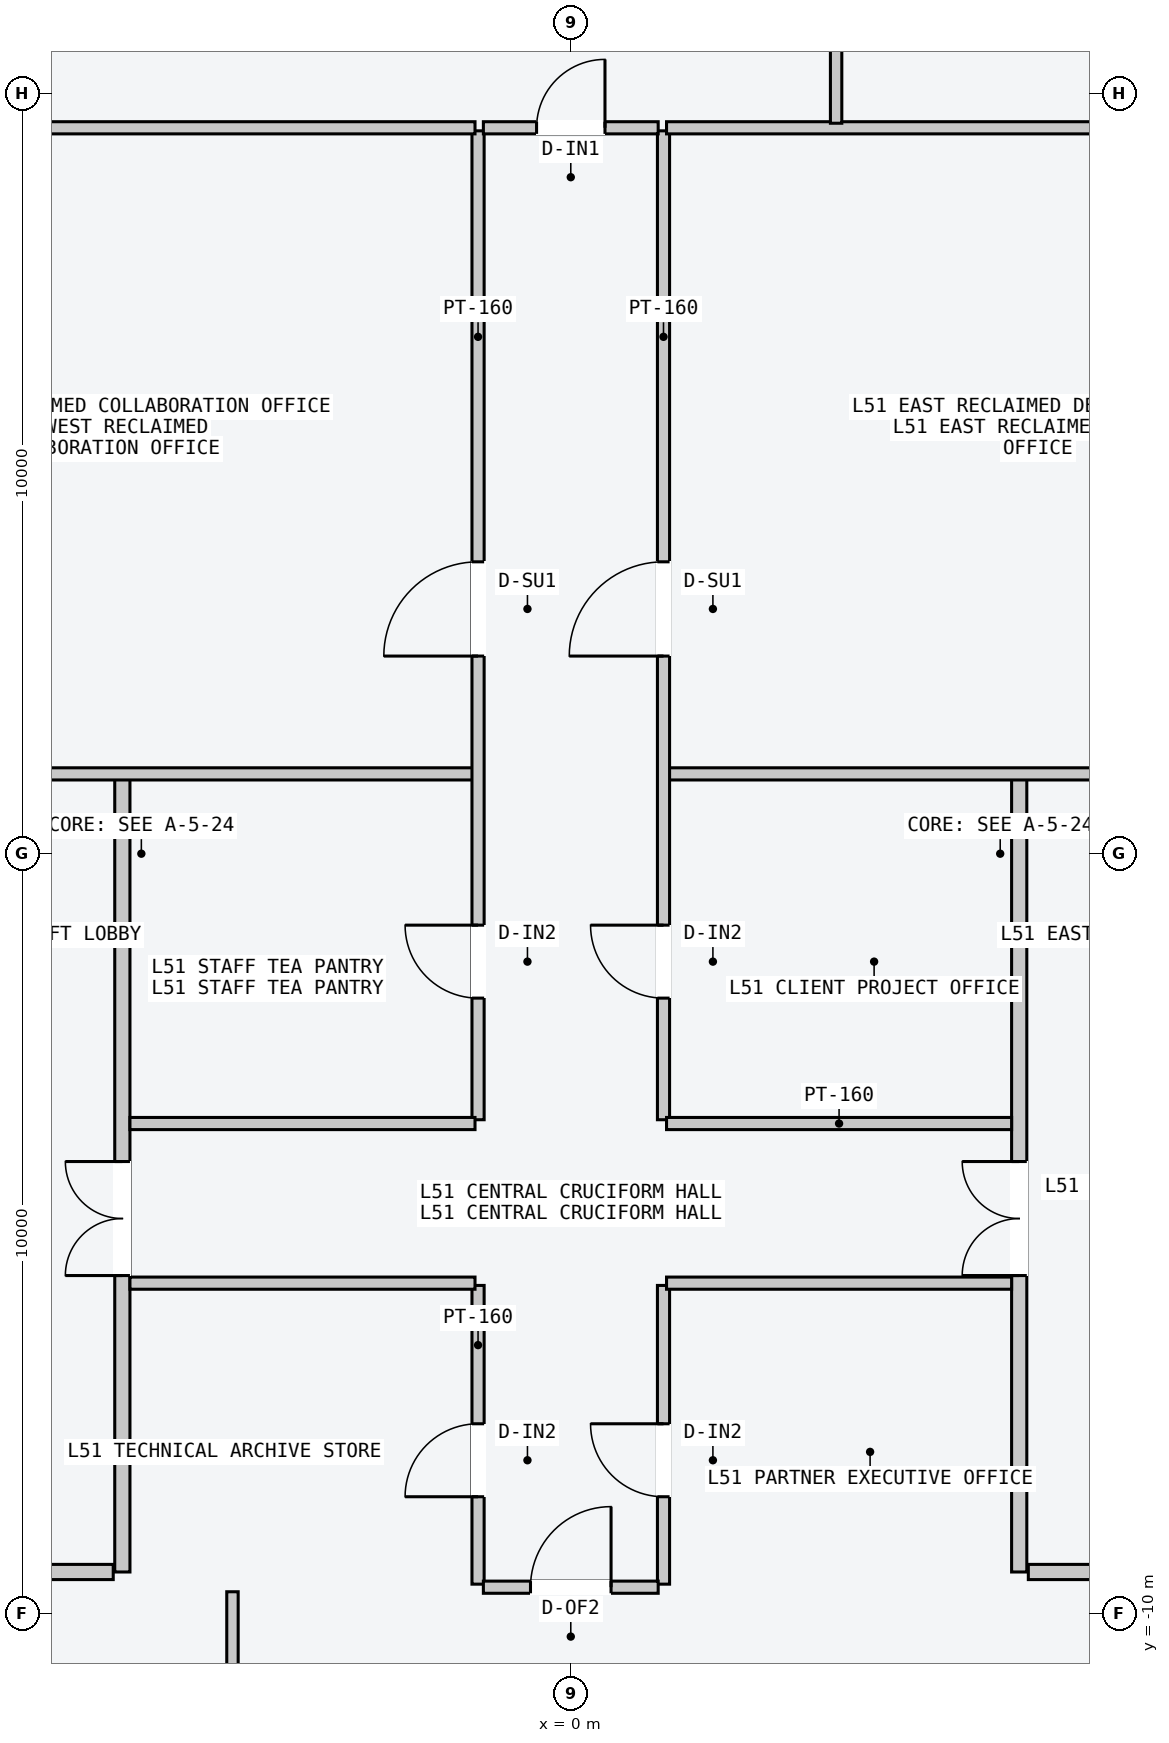
"""IFC4 building model, lengths in metres.
Left out: names, types, materials, properties, quantities, classifications, styles, units other than length and angle.
Written with IfcOpenShell. Run it as: python <this file> out.ifc"""

import sys

from ifc_helpers import new_model, si_unit, direction, frame, frame_2d, origin, place, context, subcontext, project, spatial, rectangle, extrude, element, fill, save


model = new_model("IFC4")
c1 = context("Model", 3, precision=1e-05, world=origin(), true_north=direction((0.0, 1.0)))
c2 = subcontext(c1, "Body", "Model", "MODEL_VIEW")
j1 = project(units=[si_unit("LENGTHUNIT", "METRE"), si_unit("PLANEANGLEUNIT", "RADIAN")], contexts=[c1])
p1 = place(None, origin())
s1 = spatial("IfcSite", under=j1, at=p1, CompositionType="ELEMENT")
p2 = place(p1, origin())
s2 = spatial("IfcBuilding", under=s1, at=p2, CompositionType="ELEMENT")
p3 = place(p2, frame((0.0, 0.0, 194.7)))
s3 = spatial("IfcBuildingStorey", under=s2, at=p3, CompositionType="ELEMENT", Elevation=194.7)
p4 = place(p3, frame((-5.9, -9.45, 0.0), z_axis=(0.0, 0.0, 1.0), x_axis=(0.0, 1.0, 0.0)))
e1 = element("IfcWall", 1, at=p4, inside=s3, PredefinedType="PARTITIONING", context=c2, shape_type="SweptSolid", body=[
    extrude(rectangle(XDim=10.5, YDim=0.2, at=frame_2d((5.25, 0.0))), origin(), (0.0, 0.0, 1.0), 3.4),
])
p5 = place(p4, frame((3.9, 0.0, 0.0)))
e2 = element("IfcOpeningElement", 2, at=p5, cuts=e1, PredefinedType="OPENING", context=c2, shape_type="SweptSolid", body=[
    extrude(rectangle(XDim=1.5, YDim=2.2, at=frame_2d((0.75, 1.1))), frame((0.0, 0.11, 0.0), z_axis=(0.0, -1.0, 0.0), x_axis=(1.0, 0.0, 0.0)), (0.0, 0.0, 1.0), 0.22),
])
p6 = place(p3, frame((-6.02, -9.45, 0.0), z_axis=(0.0, 0.0, 1.0), x_axis=(-1.0, 0.0, 0.0)))
e3 = element("IfcWall", 3, at=p6, inside=s3, PredefinedType="PARTITIONING", context=c2, shape_type="SweptSolid", body=[
    extrude(rectangle(XDim=1.8, YDim=0.2, at=frame_2d((0.9, 0.0))), origin(), (0.0, 0.0, 1.0), 3.4),
])
p7 = place(p3, frame((5.9, -9.45, 0.0), z_axis=(0.0, 0.0, 1.0), x_axis=(0.0, 1.0, 0.0)))
e4 = element("IfcWall", 4, at=p7, inside=s3, PredefinedType="PARTITIONING", context=c2, shape_type="SweptSolid", body=[
    extrude(rectangle(XDim=10.5, YDim=0.2, at=frame_2d((5.25, 0.0))), origin(), (0.0, 0.0, 1.0), 3.4),
])
p8 = place(p7, frame((3.9, 0.0, 0.0)))
e5 = element("IfcOpeningElement", 5, at=p8, cuts=e4, PredefinedType="OPENING", context=c2, shape_type="SweptSolid", body=[
    extrude(rectangle(XDim=1.5, YDim=2.2, at=frame_2d((0.75, 1.1))), frame((0.0, 0.11, 0.0), z_axis=(0.0, -1.0, 0.0), x_axis=(1.0, 0.0, 0.0)), (0.0, 0.0, 1.0), 0.22),
])
p9 = place(p3, frame((6.02, -9.45, 0.0), z_axis=(0.0, 0.0, 1.0), x_axis=(1.0, 0.0, 0.0)))
e6 = element("IfcWall", 6, at=p9, inside=s3, PredefinedType="PARTITIONING", context=c2, shape_type="SweptSolid", body=[
    extrude(rectangle(XDim=1.8, YDim=0.2, at=frame_2d((0.9, 0.0))), origin(), (0.0, 0.0, 1.0), 3.4),
])
p10 = place(p3, frame((-10.05, 1.05, 0.0), z_axis=(0.0, 0.0, 1.0), x_axis=(1.0, 0.0, 0.0)))
e7 = element("IfcWall", 7, at=p10, inside=s3, PredefinedType="PARTITIONING", context=c2, shape_type="SweptSolid", body=[
    extrude(rectangle(XDim=8.79, YDim=0.16, at=frame_2d((4.395, 0.0))), origin(), (0.0, 0.0, 1.0), 3.4),
])
p11 = place(p3, frame((-1.22, -3.5, 0.0), z_axis=(0.0, 0.0, 1.0), x_axis=(0.0, 1.0, 0.0)))
e8 = element("IfcWall", 8, at=p11, inside=s3, PredefinedType="PARTITIONING", context=c2, shape_type="SweptSolid", body=[
    extrude(rectangle(XDim=13.01, YDim=0.16, at=frame_2d((6.505, 0.0))), origin(), (0.0, 0.0, 1.0), 3.4),
])
p12 = place(p11, frame((6.1, 0.0, 0.0)))
e9 = element("IfcOpeningElement", 9, at=p12, cuts=e8, PredefinedType="OPENING", context=c2, shape_type="SweptSolid", body=[
    extrude(rectangle(XDim=1.24, YDim=2.24, at=frame_2d((0.62, 1.12))), frame((0.0, 0.09, 0.0), z_axis=(0.0, -1.0, 0.0), x_axis=(1.0, 0.0, 0.0)), (0.0, 0.0, 1.0), 0.18),
])
p13 = place(p11, frame((1.6, 0.0, 0.0)))
e10 = element("IfcOpeningElement", 10, at=p13, cuts=e8, PredefinedType="OPENING", context=c2, shape_type="SweptSolid", body=[
    extrude(rectangle(XDim=0.96, YDim=2.18, at=frame_2d((0.48, 1.09))), frame((0.0, 0.09, 0.0), z_axis=(0.0, -1.0, 0.0), x_axis=(1.0, 0.0, 0.0)), (0.0, 0.0, 1.0), 0.18),
])
p14 = place(p3, frame((-7.5, 9.55, 0.0), z_axis=(0.0, 0.0, 1.0), x_axis=(1.0, 0.0, 0.0)))
e11 = element("IfcWall", 11, at=p14, inside=s3, PredefinedType="PARTITIONING", context=c2, shape_type="SweptSolid", body=[
    extrude(rectangle(XDim=6.24, YDim=0.16, at=frame_2d((3.12, 0.0))), origin(), (0.0, 0.0, 1.0), 3.4),
])
p15 = place(p3, frame((-5.8, -3.55, 0.0), z_axis=(0.0, 0.0, 1.0), x_axis=(1.0, 0.0, 0.0)))
e12 = element("IfcWall", 12, at=p15, inside=s3, PredefinedType="PARTITIONING", context=c2, shape_type="SweptSolid", body=[
    extrude(rectangle(XDim=4.54, YDim=0.16, at=frame_2d((2.27, 0.0))), origin(), (0.0, 0.0, 1.0), 3.4),
])
p16 = place(p3, frame((1.26, 1.05, 0.0), z_axis=(0.0, 0.0, 1.0), x_axis=(1.0, 0.0, 0.0)))
e13 = element("IfcWall", 13, at=p16, inside=s3, PredefinedType="PARTITIONING", context=c2, shape_type="SweptSolid", body=[
    extrude(rectangle(XDim=8.8, YDim=0.16, at=frame_2d((4.4, 0.0))), origin(), (0.0, 0.0, 1.0), 3.4),
])
p17 = place(p3, frame((1.22, -3.5, 0.0), z_axis=(0.0, 0.0, 1.0), x_axis=(0.0, 1.0, 0.0)))
e14 = element("IfcWall", 14, at=p17, inside=s3, PredefinedType="PARTITIONING", context=c2, shape_type="SweptSolid", body=[
    extrude(rectangle(XDim=13.01, YDim=0.16, at=frame_2d((6.505, 0.0))), origin(), (0.0, 0.0, 1.0), 3.4),
])
p18 = place(p17, frame((6.1, 0.0, 0.0)))
e15 = element("IfcOpeningElement", 15, at=p18, cuts=e14, PredefinedType="OPENING", context=c2, shape_type="SweptSolid", body=[
    extrude(rectangle(XDim=1.24, YDim=2.24, at=frame_2d((0.62, 1.12))), frame((0.0, 0.09, 0.0), z_axis=(0.0, -1.0, 0.0), x_axis=(1.0, 0.0, 0.0)), (0.0, 0.0, 1.0), 0.18),
])
p19 = place(p17, frame((1.6, 0.0, 0.0)))
e16 = element("IfcOpeningElement", 16, at=p19, cuts=e14, PredefinedType="OPENING", context=c2, shape_type="SweptSolid", body=[
    extrude(rectangle(XDim=0.96, YDim=2.18, at=frame_2d((0.48, 1.09))), frame((0.0, 0.09, 0.0), z_axis=(0.0, -1.0, 0.0), x_axis=(1.0, 0.0, 0.0)), (0.0, 0.0, 1.0), 0.18),
])
p20 = place(p3, frame((1.26, 9.55, 0.0), z_axis=(0.0, 0.0, 1.0), x_axis=(1.0, 0.0, 0.0)))
e17 = element("IfcWall", 17, at=p20, inside=s3, PredefinedType="PARTITIONING", context=c2, shape_type="SweptSolid", body=[
    extrude(rectangle(XDim=6.24, YDim=0.16, at=frame_2d((3.12, 0.0))), origin(), (0.0, 0.0, 1.0), 3.4),
])
p21 = place(p3, frame((1.26, -3.55, 0.0), z_axis=(0.0, 0.0, 1.0), x_axis=(1.0, 0.0, 0.0)))
e18 = element("IfcWall", 18, at=p21, inside=s3, PredefinedType="PARTITIONING", context=c2, shape_type="SweptSolid", body=[
    extrude(rectangle(XDim=4.54, YDim=0.16, at=frame_2d((2.27, 0.0))), origin(), (0.0, 0.0, 1.0), 3.4),
])
p22 = place(p3, frame((-1.22, -9.61, 0.0), z_axis=(0.0, 0.0, 1.0), x_axis=(0.0, 1.0, 0.0)))
e19 = element("IfcWall", 19, at=p22, inside=s3, PredefinedType="PARTITIONING", context=c2, shape_type="SweptSolid", body=[
    extrude(rectangle(XDim=3.93, YDim=0.16, at=frame_2d((1.965, 0.0))), origin(), (0.0, 0.0, 1.0), 3.4),
])
p23 = place(p22, frame((1.15, 0.0, 0.0)))
e20 = element("IfcOpeningElement", 20, at=p23, cuts=e19, PredefinedType="OPENING", context=c2, shape_type="SweptSolid", body=[
    extrude(rectangle(XDim=0.96, YDim=2.18, at=frame_2d((0.48, 1.09))), frame((0.0, 0.09, 0.0), z_axis=(0.0, -1.0, 0.0), x_axis=(1.0, 0.0, 0.0)), (0.0, 0.0, 1.0), 0.18),
])
p24 = place(p3, frame((1.22, -9.61, 0.0), z_axis=(0.0, 0.0, 1.0), x_axis=(0.0, 1.0, 0.0)))
e21 = element("IfcWall", 21, at=p24, inside=s3, PredefinedType="PARTITIONING", context=c2, shape_type="SweptSolid", body=[
    extrude(rectangle(XDim=3.93, YDim=0.16, at=frame_2d((1.965, 0.0))), origin(), (0.0, 0.0, 1.0), 3.4),
])
p25 = place(p24, frame((1.15, 0.0, 0.0)))
e22 = element("IfcOpeningElement", 22, at=p25, cuts=e21, PredefinedType="OPENING", context=c2, shape_type="SweptSolid", body=[
    extrude(rectangle(XDim=0.96, YDim=2.18, at=frame_2d((0.48, 1.09))), frame((0.0, 0.09, 0.0), z_axis=(0.0, -1.0, 0.0), x_axis=(1.0, 0.0, 0.0)), (0.0, 0.0, 1.0), 0.18),
])
for number, where, z_axis, x_axis in (
    (23, (-5.8, -5.65, 0.0), (0.0, 0.0, 1.0), (1.0, 0.0, 0.0)),
    (24, (1.26, -5.65, 0.0), (0.0, 0.0, 1.0), (1.0, 0.0, 0.0)),
):
    element("IfcWall", number, at=place(p3, frame(where, z_axis=z_axis, x_axis=x_axis)), inside=s3, PredefinedType="PARTITIONING", context=c2, shape_type="SweptSolid", body=[
        extrude(rectangle(XDim=4.54, YDim=0.16, at=frame_2d((2.27, 0.0))), origin(), (0.0, 0.0, 1.0), 3.4),
    ])
p26 = place(p3, frame((3.491, 9.61, 0.0), z_axis=(0.0, 0.0, 1.0), x_axis=(0.0, 1.0, 0.0)))
e25 = element("IfcWall", 25, at=p26, inside=s3, PredefinedType="PARTITIONING", context=c2, shape_type="SweptSolid", body=[
    extrude(rectangle(XDim=8.95, YDim=0.15, at=frame_2d((4.475, 0.0))), origin(), (0.0, 0.0, 1.0), 3.4),
])
p27 = place(p26, frame((1.15, 0.0, 0.0)))
e26 = element("IfcOpeningElement", 26, at=p27, cuts=e25, PredefinedType="OPENING", context=c2, shape_type="SweptSolid", body=[
    extrude(rectangle(XDim=0.96, YDim=2.18, at=frame_2d((0.48, 1.09))), frame((0.0, 0.085, 0.0), z_axis=(0.0, -1.0, 0.0), x_axis=(1.0, 0.0, 0.0)), (0.0, 0.0, 1.0), 0.17),
])
p28 = place(p3, frame((-1.15, 9.55, 0.0), z_axis=(0.0, 0.0, 1.0), x_axis=(1.0, 0.0, 0.0)))
e27 = element("IfcWall", 27, at=p28, inside=s3, PredefinedType="PARTITIONING", context=c2, shape_type="SweptSolid", body=[
    extrude(rectangle(XDim=2.3, YDim=0.16, at=frame_2d((1.15, 0.0))), origin(), (0.0, 0.0, 1.0), 3.4),
])
p29 = place(p28, frame((0.7, 0.0, 0.0)))
e28 = element("IfcOpeningElement", 28, at=p29, cuts=e27, PredefinedType="OPENING", context=c2, shape_type="SweptSolid", body=[
    extrude(rectangle(XDim=0.9, YDim=2.15, at=frame_2d((0.45, 1.075))), frame((0.0, 0.09, 0.0), z_axis=(0.0, -1.0, 0.0), x_axis=(1.0, 0.0, 0.0)), (0.0, 0.0, 1.0), 0.18),
])
p30 = place(p3, frame((-4.451, -18.56, 0.0), z_axis=(0.0, 0.0, 1.0), x_axis=(0.0, 1.0, 0.0)))
e29 = element("IfcWall", 29, at=p30, inside=s3, PredefinedType="PARTITIONING", context=c2, shape_type="SweptSolid", body=[
    extrude(rectangle(XDim=8.85, YDim=0.15, at=frame_2d((4.425, 0.0))), origin(), (0.0, 0.0, 1.0), 3.4),
])
p31 = place(p30, frame((1.05, 0.0, 0.0)))
e30 = element("IfcOpeningElement", 30, at=p31, cuts=e29, PredefinedType="OPENING", context=c2, shape_type="SweptSolid", body=[
    extrude(rectangle(XDim=0.96, YDim=2.18, at=frame_2d((0.48, 1.09))), frame((0.0, 0.085, 0.0), z_axis=(0.0, -1.0, 0.0), x_axis=(1.0, 0.0, 0.0)), (0.0, 0.0, 1.0), 0.17),
])
p32 = place(p3, frame((-1.15, -9.65, 0.0), z_axis=(0.0, 0.0, 1.0), x_axis=(1.0, 0.0, 0.0)))
e31 = element("IfcWall", 31, at=p32, inside=s3, PredefinedType="PARTITIONING", context=c2, shape_type="SweptSolid", body=[
    extrude(rectangle(XDim=2.3, YDim=0.16, at=frame_2d((1.15, 0.0))), origin(), (0.0, 0.0, 1.0), 2.75),
])
p33 = place(p32, frame((0.62, 0.0, 0.0)))
e32 = element("IfcOpeningElement", 32, at=p33, cuts=e31, PredefinedType="OPENING", context=c2, shape_type="SweptSolid", body=[
    extrude(rectangle(XDim=1.06, YDim=2.2, at=frame_2d((0.53, 1.1))), frame((0.0, 0.09, 0.0), z_axis=(0.0, -1.0, 0.0), x_axis=(1.0, 0.0, 0.0)), (0.0, 0.0, 1.0), 0.18),
])
p34 = place(p5, origin())
e33 = element("IfcDoor", 33, at=p34, inside=s3, OperationType="DOUBLE_DOOR_SINGLE_SWING", PredefinedType="DOOR", context=c2, shape_type="SweptSolid", body=[
    extrude(rectangle(XDim=1.5, YDim=2.2, at=frame_2d((0.75, 1.1))), frame((0.0, 0.025, 0.0), z_axis=(0.0, -1.0, 0.0), x_axis=(1.0, 0.0, 0.0)), (0.0, 0.0, 1.0), 0.05),
])
fill(e2, e33)
p35 = place(p8, origin())
e34 = element("IfcDoor", 34, at=p35, inside=s3, OperationType="DOUBLE_DOOR_SINGLE_SWING", PredefinedType="DOOR", context=c2, shape_type="SweptSolid", body=[
    extrude(rectangle(XDim=1.5, YDim=2.2, at=frame_2d((0.75, 1.1))), frame((0.0, 0.025, 0.0), z_axis=(0.0, -1.0, 0.0), x_axis=(1.0, 0.0, 0.0)), (0.0, 0.0, 1.0), 0.05),
])
fill(e5, e34)
p36 = place(p12, origin())
e35 = element("IfcDoor", 35, at=p36, inside=s3, OperationType="SINGLE_SWING_LEFT", PredefinedType="DOOR", context=c2, shape_type="SweptSolid", body=[
    extrude(rectangle(XDim=1.24, YDim=2.24, at=frame_2d((0.62, 1.12))), frame((0.0, 0.025, 0.0), z_axis=(0.0, -1.0, 0.0), x_axis=(1.0, 0.0, 0.0)), (0.0, 0.0, 1.0), 0.05),
])
fill(e9, e35)
p37 = place(p13, origin())
e36 = element("IfcDoor", 36, at=p37, inside=s3, OperationType="SINGLE_SWING_RIGHT", PredefinedType="DOOR", context=c2, shape_type="SweptSolid", body=[
    extrude(rectangle(XDim=0.96, YDim=2.18, at=frame_2d((0.48, 1.09))), frame((0.0, 0.025, 0.0), z_axis=(0.0, -1.0, 0.0), x_axis=(1.0, 0.0, 0.0)), (0.0, 0.0, 1.0), 0.05),
])
fill(e10, e36)
p38 = place(p18, origin())
e37 = element("IfcDoor", 37, at=p38, inside=s3, OperationType="SINGLE_SWING_LEFT", PredefinedType="DOOR", context=c2, shape_type="SweptSolid", body=[
    extrude(rectangle(XDim=1.24, YDim=2.24, at=frame_2d((0.62, 1.12))), frame((0.0, 0.025, 0.0), z_axis=(0.0, -1.0, 0.0), x_axis=(1.0, 0.0, 0.0)), (0.0, 0.0, 1.0), 0.05),
])
fill(e15, e37)
p39 = place(p19, origin())
e38 = element("IfcDoor", 38, at=p39, inside=s3, OperationType="SINGLE_SWING_RIGHT", PredefinedType="DOOR", context=c2, shape_type="SweptSolid", body=[
    extrude(rectangle(XDim=0.96, YDim=2.18, at=frame_2d((0.48, 1.09))), frame((0.0, 0.025, 0.0), z_axis=(0.0, -1.0, 0.0), x_axis=(1.0, 0.0, 0.0)), (0.0, 0.0, 1.0), 0.05),
])
fill(e16, e38)
p40 = place(p23, origin())
e39 = element("IfcDoor", 39, at=p40, inside=s3, OperationType="SINGLE_SWING_LEFT", PredefinedType="DOOR", context=c2, shape_type="SweptSolid", body=[
    extrude(rectangle(XDim=0.96, YDim=2.18, at=frame_2d((0.48, 1.09))), frame((0.0, 0.025, 0.0), z_axis=(0.0, -1.0, 0.0), x_axis=(1.0, 0.0, 0.0)), (0.0, 0.0, 1.0), 0.05),
])
fill(e20, e39)
p41 = place(p25, origin())
e40 = element("IfcDoor", 40, at=p41, inside=s3, OperationType="SINGLE_SWING_RIGHT", PredefinedType="DOOR", context=c2, shape_type="SweptSolid", body=[
    extrude(rectangle(XDim=0.96, YDim=2.18, at=frame_2d((0.48, 1.09))), frame((0.0, 0.025, 0.0), z_axis=(0.0, -1.0, 0.0), x_axis=(1.0, 0.0, 0.0)), (0.0, 0.0, 1.0), 0.05),
])
fill(e22, e40)
p42 = place(p29, origin())
e41 = element("IfcDoor", 41, at=p42, inside=s3, OperationType="SINGLE_SWING_RIGHT", PredefinedType="DOOR", context=c2, shape_type="SweptSolid", body=[
    extrude(rectangle(XDim=0.9, YDim=2.15, at=frame_2d((0.45, 1.075))), frame((0.0, 0.025, 0.0), z_axis=(0.0, -1.0, 0.0), x_axis=(1.0, 0.0, 0.0)), (0.0, 0.0, 1.0), 0.05),
])
fill(e28, e41)
p43 = place(p33, origin())
e42 = element("IfcDoor", 42, at=p43, inside=s3, OperationType="SINGLE_SWING_RIGHT", PredefinedType="DOOR", context=c2, shape_type="SweptSolid", body=[
    extrude(rectangle(XDim=1.06, YDim=2.2, at=frame_2d((0.53, 1.1))), frame((0.0, 0.025, 0.0), z_axis=(0.0, -1.0, 0.0), x_axis=(1.0, 0.0, 0.0)), (0.0, 0.0, 1.0), 0.05),
])
fill(e32, e42)
save(model, sys.argv[1])
